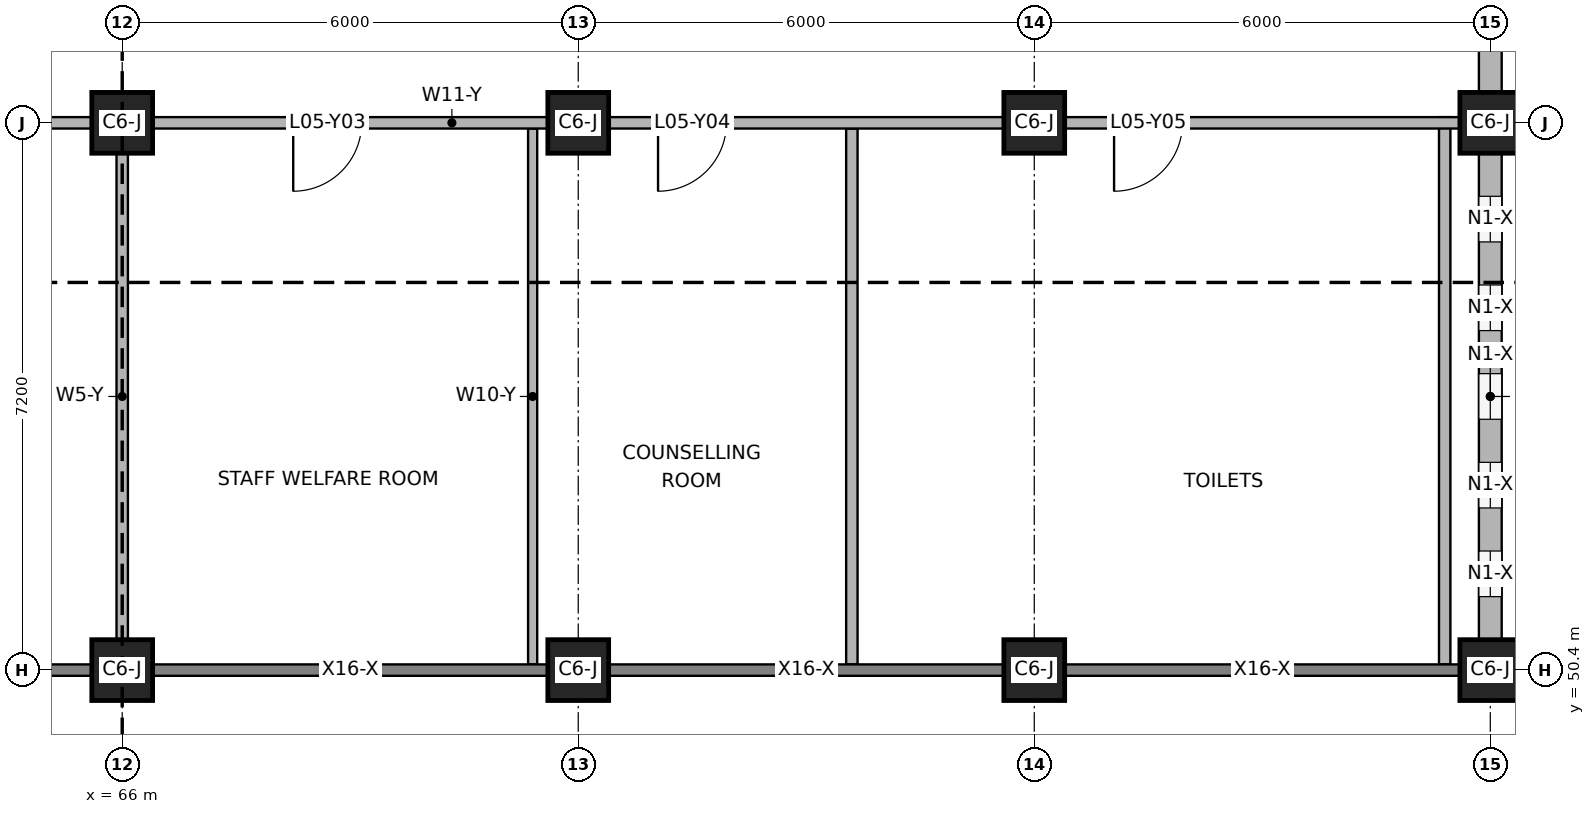
"""IFC4 building model, lengths in metres.
Left out: names, types, materials, properties, quantities, classifications, styles, units other than length and angle.
Written with IfcOpenShell. Run it as: python <this file> out.ifc"""

import sys

from ifc_helpers import new_model, si_unit, direction, frame, frame_2d, origin, origin_2d, place, context, subcontext, project, spatial, rectangle, extrude, element, fill, save


model = new_model("IFC4")
c1 = context("Model", 3, precision=1e-05, world=origin(), true_north=direction((0.0, 1.0)))
c2 = subcontext(c1, "Body", "Model", "MODEL_VIEW")
j1 = project(units=[si_unit("LENGTHUNIT", "METRE"), si_unit("PLANEANGLEUNIT", "RADIAN")], contexts=[c1])
p1 = place(None, origin())
s1 = spatial("IfcSite", under=j1, at=p1, CompositionType="ELEMENT")
p2 = place(p1, origin())
s2 = spatial("IfcBuilding", under=s1, at=p2, CompositionType="ELEMENT")
p3 = place(p2, frame((0.0, 0.0, 21.0)))
s3 = spatial("IfcBuildingStorey", under=s2, at=p3, CompositionType="ELEMENT", Elevation=21.0)
for number, where, z_axis, x_axis in (
    (1, (66.0, 50.4, 0.0), (0.0, 0.0, 1.0), (1.0, 0.0, 0.0)),
    (2, (72.0, 50.4, 0.0), (0.0, 0.0, 1.0), (1.0, 0.0, 0.0)),
    (3, (78.0, 50.4, 0.0), (0.0, 0.0, 1.0), (1.0, 0.0, 0.0)),
    (4, (84.0, 50.4, 0.0), (0.0, 0.0, 1.0), (1.0, 0.0, 0.0)),
    (5, (66.0, 57.6, 0.0), (0.0, 0.0, 1.0), (1.0, 0.0, 0.0)),
    (6, (72.0, 57.6, 0.0), (0.0, 0.0, 1.0), (1.0, 0.0, 0.0)),
    (7, (78.0, 57.6, 0.0), (0.0, 0.0, 1.0), (1.0, 0.0, 0.0)),
    (8, (84.0, 57.6, 0.0), (0.0, 0.0, 1.0), (1.0, 0.0, 0.0)),
):
    element("IfcColumn", number, at=place(p3, frame(where, z_axis=z_axis, x_axis=x_axis)), inside=s3, PredefinedType="COLUMN", context=c2, shape_type="SweptSolid", body=[
        extrude(rectangle(XDim=0.8, YDim=0.8, at=origin_2d()), origin(), (0.0, 0.0, 1.0), 3.95),
    ])
p4 = place(p3, frame((84.0, 50.8, 0.0), z_axis=(0.0, 0.0, 1.0), x_axis=(0.0, 1.0, 0.0)))
e9 = element("IfcWall", 9, at=p4, inside=s3, PredefinedType="SOLIDWALL", context=c2, shape_type="SweptSolid", body=[
    extrude(rectangle(XDim=6.4, YDim=0.3, at=frame_2d((3.2, 0.0))), origin(), (0.0, 0.0, 1.0), 3.15),
])
p5 = place(p4, frame((0.567, 0.0, 0.9)))
e10 = element("IfcOpeningElement", 10, at=p5, cuts=e9, PredefinedType="OPENING", context=c2, shape_type="SweptSolid", body=[
    extrude(rectangle(XDim=0.6, YDim=1.9, at=frame_2d((0.3, 0.95))), frame((0.0, 0.16, 0.0), z_axis=(0.0, -1.0, 0.0), x_axis=(1.0, 0.0, 0.0)), (0.0, 0.0, 1.0), 0.32),
])
p6 = place(p4, frame((1.733, 0.0, 0.9)))
e11 = element("IfcOpeningElement", 11, at=p6, cuts=e9, PredefinedType="OPENING", context=c2, shape_type="SweptSolid", body=[
    extrude(rectangle(XDim=0.6, YDim=1.9, at=frame_2d((0.3, 0.95))), frame((0.0, 0.16, 0.0), z_axis=(0.0, -1.0, 0.0), x_axis=(1.0, 0.0, 0.0)), (0.0, 0.0, 1.0), 0.32),
])
p7 = place(p4, frame((2.9, 0.0, 0.9)))
e12 = element("IfcOpeningElement", 12, at=p7, cuts=e9, PredefinedType="OPENING", context=c2, shape_type="SweptSolid", body=[
    extrude(rectangle(XDim=0.6, YDim=1.9, at=frame_2d((0.3, 0.95))), frame((0.0, 0.16, 0.0), z_axis=(0.0, -1.0, 0.0), x_axis=(1.0, 0.0, 0.0)), (0.0, 0.0, 1.0), 0.32),
])
p8 = place(p4, frame((4.067, 0.0, 0.9)))
e13 = element("IfcOpeningElement", 13, at=p8, cuts=e9, PredefinedType="OPENING", context=c2, shape_type="SweptSolid", body=[
    extrude(rectangle(XDim=0.6, YDim=1.9, at=frame_2d((0.3, 0.95))), frame((0.0, 0.16, 0.0), z_axis=(0.0, -1.0, 0.0), x_axis=(1.0, 0.0, 0.0)), (0.0, 0.0, 1.0), 0.32),
])
p9 = place(p4, frame((5.233, 0.0, 0.9)))
e14 = element("IfcOpeningElement", 14, at=p9, cuts=e9, PredefinedType="OPENING", context=c2, shape_type="SweptSolid", body=[
    extrude(rectangle(XDim=0.6, YDim=1.9, at=frame_2d((0.3, 0.95))), frame((0.0, 0.16, 0.0), z_axis=(0.0, -1.0, 0.0), x_axis=(1.0, 0.0, 0.0)), (0.0, 0.0, 1.0), 0.32),
])
p10 = place(p3, frame((84.0, 58.0, 0.0), z_axis=(0.0, 0.0, 1.0), x_axis=(0.0, 1.0, 0.0)))
e15 = element("IfcWall", 15, at=p10, inside=s3, PredefinedType="SOLIDWALL", context=c2, shape_type="SweptSolid", body=[
    extrude(rectangle(XDim=6.8, YDim=0.3, at=frame_2d((3.4, 0.0))), origin(), (0.0, 0.0, 1.0), 3.05),
])
p11 = place(p10, frame((0.56, 0.0, 0.9)))
e16 = element("IfcOpeningElement", 16, at=p11, cuts=e15, PredefinedType="OPENING", context=c2, shape_type="SweptSolid", body=[
    extrude(rectangle(XDim=0.6, YDim=1.9, at=frame_2d((0.3, 0.95))), frame((0.0, 0.16, 0.0), z_axis=(0.0, -1.0, 0.0), x_axis=(1.0, 0.0, 0.0)), (0.0, 0.0, 1.0), 0.32),
])
p12 = place(p10, frame((2.9, 0.0, 0.9)))
e17 = element("IfcOpeningElement", 17, at=p12, cuts=e15, PredefinedType="OPENING", context=c2, shape_type="SweptSolid", body=[
    extrude(rectangle(XDim=0.6, YDim=1.9, at=frame_2d((0.3, 0.95))), frame((0.0, 0.16, 0.0), z_axis=(0.0, -1.0, 0.0), x_axis=(1.0, 0.0, 0.0)), (0.0, 0.0, 1.0), 0.32),
])
p13 = place(p10, frame((5.44, 0.0, 0.9)))
e18 = element("IfcOpeningElement", 18, at=p13, cuts=e15, PredefinedType="OPENING", context=c2, shape_type="SweptSolid", body=[
    extrude(rectangle(XDim=0.6, YDim=1.9, at=frame_2d((0.3, 0.95))), frame((0.0, 0.16, 0.0), z_axis=(0.0, -1.0, 0.0), x_axis=(1.0, 0.0, 0.0)), (0.0, 0.0, 1.0), 0.32),
])
p14 = place(p3, frame((66.0, 50.8, 0.0), z_axis=(0.0, 0.0, 1.0), x_axis=(0.0, 1.0, 0.0)))
e19 = element("IfcWall", 19, at=p14, inside=s3, PredefinedType="PARTITIONING", context=c2, shape_type="SweptSolid", body=[
    extrude(rectangle(XDim=6.4, YDim=0.15, at=frame_2d((3.2, 0.0))), origin(), (0.0, 0.0, 1.0), 3.15),
])
p15 = place(p3, frame((71.4, 50.475, 0.0), z_axis=(0.0, 0.0, 1.0), x_axis=(0.0, 1.0, 0.0)))
e20 = element("IfcWall", 20, at=p15, inside=s3, PredefinedType="PARTITIONING", context=c2, shape_type="SweptSolid", body=[
    extrude(rectangle(XDim=7.05, YDim=0.12, at=frame_2d((3.525, 0.0))), origin(), (0.0, 0.0, 1.0), 3.25),
])
p16 = place(p3, frame((75.6, 50.475, 0.0), z_axis=(0.0, 0.0, 1.0), x_axis=(0.0, 1.0, 0.0)))
e21 = element("IfcWall", 21, at=p16, inside=s3, PredefinedType="PARTITIONING", context=c2, shape_type="SweptSolid", body=[
    extrude(rectangle(XDim=7.05, YDim=0.15, at=frame_2d((3.525, 0.0))), origin(), (0.0, 0.0, 1.0), 3.25),
])
p17 = place(p3, frame((83.4, 50.475, 0.0), z_axis=(0.0, 0.0, 1.0), x_axis=(0.0, 1.0, 0.0)))
e22 = element("IfcWall", 22, at=p17, inside=s3, PredefinedType="PARTITIONING", context=c2, shape_type="SweptSolid", body=[
    extrude(rectangle(XDim=7.2, YDim=0.15, at=frame_2d((3.6, 0.0))), origin(), (0.0, 0.0, 1.0), 3.25),
])
p18 = place(p3, frame((57.075, 57.6, 0.0), z_axis=(0.0, 0.0, 1.0), x_axis=(1.0, 0.0, 0.0)))
e23 = element("IfcWall", 23, at=p18, inside=s3, PredefinedType="PARTITIONING", context=c2, shape_type="SweptSolid", body=[
    extrude(rectangle(XDim=26.525, YDim=0.15, at=frame_2d((13.263, 0.0))), origin(), (0.0, 0.0, 1.0), 3.25),
])
p19 = place(p18, frame((3.825, 0.0, 0.0)))
e24 = element("IfcOpeningElement", 24, at=p19, cuts=e23, PredefinedType="OPENING", context=c2, shape_type="SweptSolid", body=[
    extrude(rectangle(XDim=1.2, YDim=2.1, at=frame_2d((0.6, 1.05))), frame((0.0, 0.085, 0.0), z_axis=(0.0, -1.0, 0.0), x_axis=(1.0, 0.0, 0.0)), (0.0, 0.0, 1.0), 0.17),
])
p20 = place(p18, frame((11.175, 0.0, 0.0)))
e25 = element("IfcOpeningElement", 25, at=p20, cuts=e23, PredefinedType="OPENING", context=c2, shape_type="SweptSolid", body=[
    extrude(rectangle(XDim=0.9, YDim=2.1, at=frame_2d((0.45, 1.05))), frame((0.0, 0.085, 0.0), z_axis=(0.0, -1.0, 0.0), x_axis=(1.0, 0.0, 0.0)), (0.0, 0.0, 1.0), 0.17),
])
p21 = place(p18, frame((15.975, 0.0, 0.0)))
e26 = element("IfcOpeningElement", 26, at=p21, cuts=e23, PredefinedType="OPENING", context=c2, shape_type="SweptSolid", body=[
    extrude(rectangle(XDim=0.9, YDim=2.1, at=frame_2d((0.45, 1.05))), frame((0.0, 0.085, 0.0), z_axis=(0.0, -1.0, 0.0), x_axis=(1.0, 0.0, 0.0)), (0.0, 0.0, 1.0), 0.17),
])
p22 = place(p18, frame((21.975, 0.0, 0.0)))
e27 = element("IfcOpeningElement", 27, at=p22, cuts=e23, PredefinedType="OPENING", context=c2, shape_type="SweptSolid", body=[
    extrude(rectangle(XDim=0.9, YDim=2.1, at=frame_2d((0.45, 1.05))), frame((0.0, 0.085, 0.0), z_axis=(0.0, -1.0, 0.0), x_axis=(1.0, 0.0, 0.0)), (0.0, 0.0, 1.0), 0.17),
])
p23 = place(p5, origin())
e28 = element("IfcWindow", 28, at=p23, inside=s3, PartitioningType="SINGLE_PANEL", PredefinedType="WINDOW", context=c2, shape_type="SweptSolid", body=[
    extrude(rectangle(XDim=0.6, YDim=1.9, at=frame_2d((0.3, 0.95))), frame((0.0, 0.03, 0.0), z_axis=(0.0, -1.0, 0.0), x_axis=(1.0, 0.0, 0.0)), (0.0, 0.0, 1.0), 0.06),
])
fill(e10, e28)
p24 = place(p6, origin())
e29 = element("IfcWindow", 29, at=p24, inside=s3, PartitioningType="SINGLE_PANEL", PredefinedType="WINDOW", context=c2, shape_type="SweptSolid", body=[
    extrude(rectangle(XDim=0.6, YDim=1.9, at=frame_2d((0.3, 0.95))), frame((0.0, 0.03, 0.0), z_axis=(0.0, -1.0, 0.0), x_axis=(1.0, 0.0, 0.0)), (0.0, 0.0, 1.0), 0.06),
])
fill(e11, e29)
p25 = place(p7, origin())
e30 = element("IfcWindow", 30, at=p25, inside=s3, PartitioningType="SINGLE_PANEL", PredefinedType="WINDOW", context=c2, shape_type="SweptSolid", body=[
    extrude(rectangle(XDim=0.6, YDim=1.9, at=frame_2d((0.3, 0.95))), frame((0.0, 0.03, 0.0), z_axis=(0.0, -1.0, 0.0), x_axis=(1.0, 0.0, 0.0)), (0.0, 0.0, 1.0), 0.06),
])
fill(e12, e30)
p26 = place(p8, origin())
e31 = element("IfcWindow", 31, at=p26, inside=s3, PartitioningType="SINGLE_PANEL", PredefinedType="WINDOW", context=c2, shape_type="SweptSolid", body=[
    extrude(rectangle(XDim=0.6, YDim=1.9, at=frame_2d((0.3, 0.95))), frame((0.0, 0.03, 0.0), z_axis=(0.0, -1.0, 0.0), x_axis=(1.0, 0.0, 0.0)), (0.0, 0.0, 1.0), 0.06),
])
fill(e13, e31)
p27 = place(p9, origin())
e32 = element("IfcWindow", 32, at=p27, inside=s3, PartitioningType="SINGLE_PANEL", PredefinedType="WINDOW", context=c2, shape_type="SweptSolid", body=[
    extrude(rectangle(XDim=0.6, YDim=1.9, at=frame_2d((0.3, 0.95))), frame((0.0, 0.03, 0.0), z_axis=(0.0, -1.0, 0.0), x_axis=(1.0, 0.0, 0.0)), (0.0, 0.0, 1.0), 0.06),
])
fill(e14, e32)
p28 = place(p20, frame((0.9, 0.0, 0.0), z_axis=(0.0, 0.0, 1.0), x_axis=(-1.0, 0.0, 0.0)))
e33 = element("IfcDoor", 33, at=p28, inside=s3, OperationType="SINGLE_SWING_RIGHT", PredefinedType="DOOR", context=c2, shape_type="SweptSolid", body=[
    extrude(rectangle(XDim=0.9, YDim=2.1, at=frame_2d((0.45, 1.05))), frame((0.0, 0.025, 0.0), z_axis=(0.0, -1.0, 0.0), x_axis=(1.0, 0.0, 0.0)), (0.0, 0.0, 1.0), 0.05),
])
fill(e25, e33)
p29 = place(p21, frame((0.9, 0.0, 0.0), z_axis=(0.0, 0.0, 1.0), x_axis=(-1.0, 0.0, 0.0)))
e34 = element("IfcDoor", 34, at=p29, inside=s3, OperationType="SINGLE_SWING_RIGHT", PredefinedType="DOOR", context=c2, shape_type="SweptSolid", body=[
    extrude(rectangle(XDim=0.9, YDim=2.1, at=frame_2d((0.45, 1.05))), frame((0.0, 0.025, 0.0), z_axis=(0.0, -1.0, 0.0), x_axis=(1.0, 0.0, 0.0)), (0.0, 0.0, 1.0), 0.05),
])
fill(e26, e34)
p30 = place(p22, frame((0.9, 0.0, 0.0), z_axis=(0.0, 0.0, 1.0), x_axis=(-1.0, 0.0, 0.0)))
e35 = element("IfcDoor", 35, at=p30, inside=s3, OperationType="SINGLE_SWING_RIGHT", PredefinedType="DOOR", context=c2, shape_type="SweptSolid", body=[
    extrude(rectangle(XDim=0.9, YDim=2.1, at=frame_2d((0.45, 1.05))), frame((0.0, 0.025, 0.0), z_axis=(0.0, -1.0, 0.0), x_axis=(1.0, 0.0, 0.0)), (0.0, 0.0, 1.0), 0.05),
])
fill(e27, e35)
save(model, sys.argv[1])
